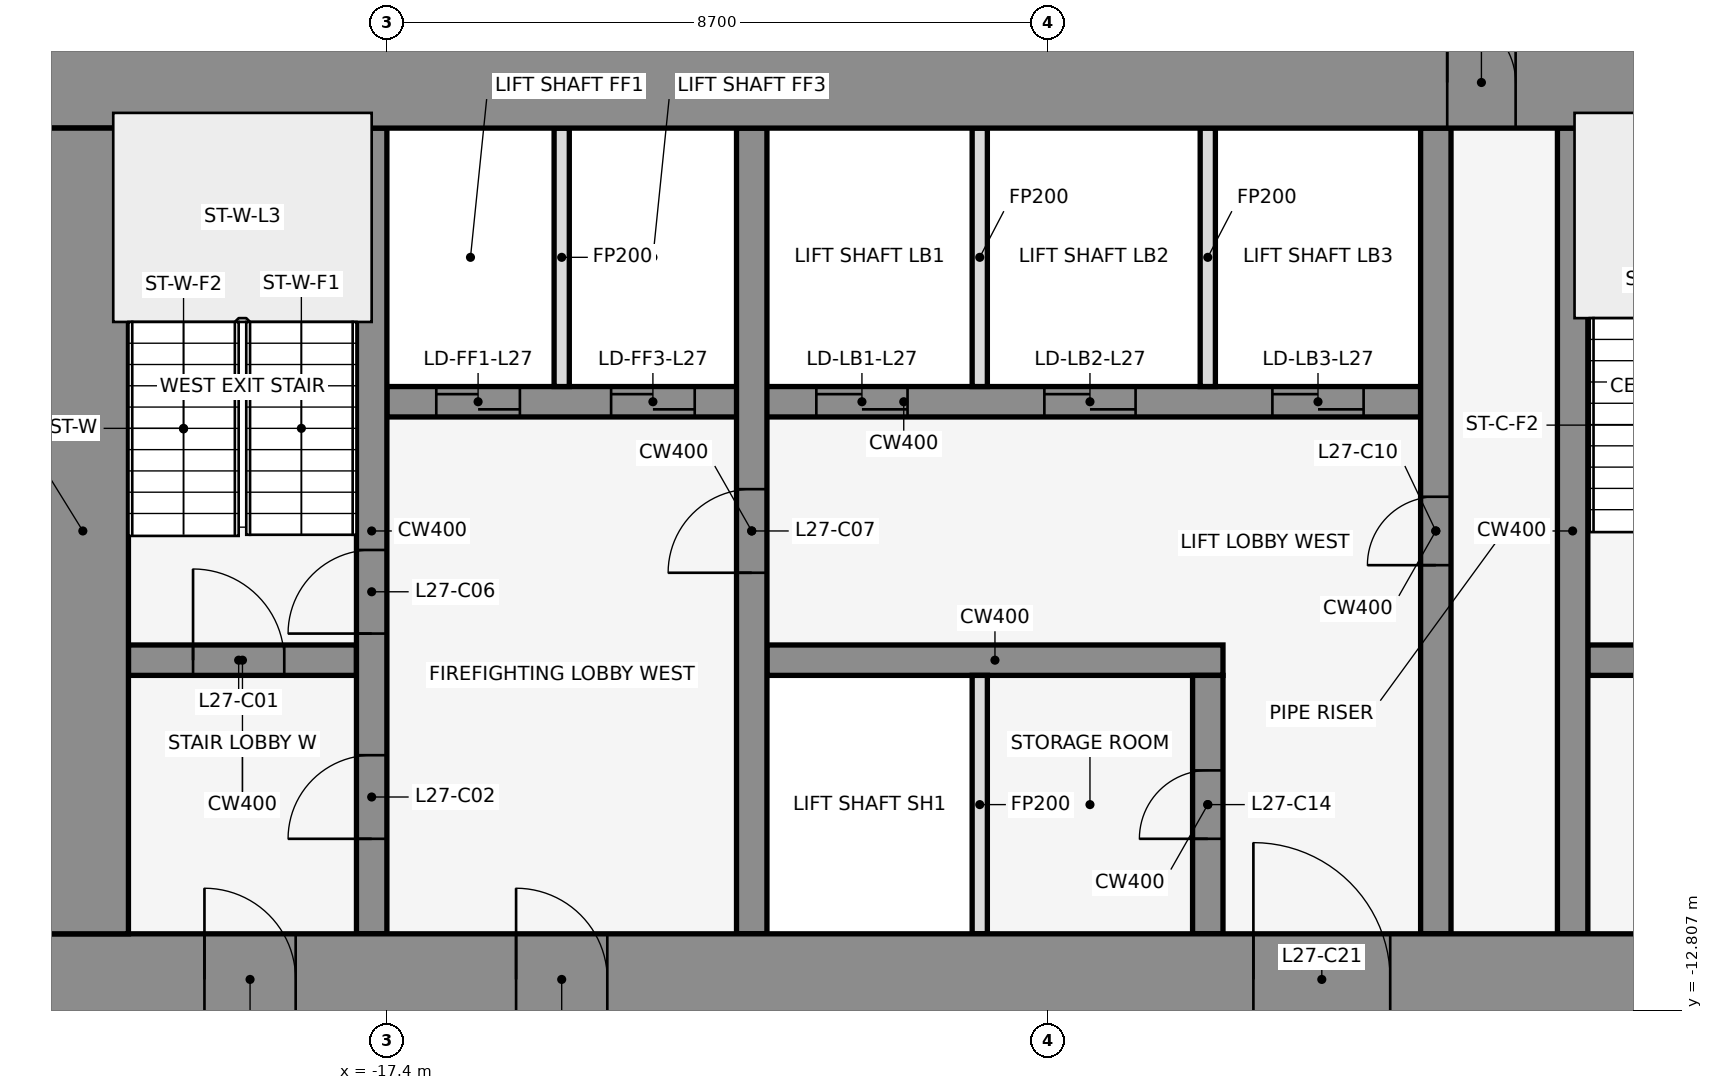
"""IFC4 building model, lengths in metres.
Left out: names, types, materials, properties, quantities, classifications, styles, units other than length and angle.
Written with IfcOpenShell. Run it as: python <this file> out.ifc"""

import sys

from ifc_helpers import new_model, si_unit, direction, frame, frame_2d, origin, place, context, subcontext, project, spatial, rectangle, extrude, element, fill, save


model = new_model("IFC4")
c1 = context("Model", 3, precision=1e-05, world=origin(), true_north=direction((0.0, 1.0)))
c2 = subcontext(c1, "Body", "Model", "MODEL_VIEW")
j1 = project(units=[si_unit("LENGTHUNIT", "METRE"), si_unit("PLANEANGLEUNIT", "RADIAN")], contexts=[c1])
p1 = place(None, origin())
s1 = spatial("IfcSite", under=j1, at=p1, CompositionType="ELEMENT")
p2 = place(p1, origin())
s2 = spatial("IfcBuilding", under=s1, at=p2, CompositionType="ELEMENT")
p3 = place(p2, frame((0.0, 0.0, 126.8)))
s3 = spatial("IfcBuildingStorey", under=s2, at=p3, CompositionType="ELEMENT", Elevation=126.8)
for number, where, z_axis, x_axis in (
    (1, (-0.068, -0.105, 0.0), (0.0, 0.0, 1.0), (-0.84, 0.543, 0.0)),
    (2, (-14.599, 1.08, 0.0), (0.0, 0.0, 1.0), (-0.84, -0.543, 0.0)),
):
    element("IfcWall", number, at=place(p3, frame(where, z_axis=z_axis, x_axis=x_axis)), inside=s3, PredefinedType="STANDARD", context=c2, shape_type="SweptSolid", body=[
        extrude(rectangle(XDim=2.183, YDim=0.25, at=frame_2d((1.091, 0.0))), origin(), (0.0, 0.0, 1.0), 3.95),
    ])
p4 = place(p3, frame((-20.8, -8.2, 0.0), z_axis=(0.0, 0.0, 1.0), x_axis=(1.0, 0.0, 0.0)))
e3 = element("IfcWall", 3, at=p4, inside=s3, PredefinedType="SHEAR", context=c2, shape_type="SweptSolid", body=[
    extrude(rectangle(XDim=3.0, YDim=0.4, at=frame_2d((1.5, 0.0))), origin(), (0.0, 0.0, 1.0), 4.1),
])
p5 = place(p4, frame((0.85, 0.0, 0.0)))
e4 = element("IfcOpeningElement", 4, at=p5, cuts=e3, PredefinedType="OPENING", context=c2, shape_type="SweptSolid", body=[
    extrude(rectangle(XDim=1.2, YDim=2.1, at=frame_2d((0.6, 1.05))), frame((0.0, 0.212, 0.0), z_axis=(0.0, -1.0, 0.0), x_axis=(1.0, 0.0, 0.0)), (0.0, 0.0, 1.0), 0.424),
])
p6 = place(p3, frame((-12.4, -8.2, 0.0), z_axis=(0.0, 0.0, 1.0), x_axis=(1.0, 0.0, 0.0)))
e5 = element("IfcWall", 5, at=p6, inside=s3, PredefinedType="SHEAR", context=c2, shape_type="SweptSolid", body=[
    extrude(rectangle(XDim=6.0, YDim=0.4, at=frame_2d((3.0, 0.0))), origin(), (0.0, 0.0, 1.0), 4.1),
])
p7 = place(p3, frame((-1.6, -8.2, 0.0), z_axis=(0.0, 0.0, 1.0), x_axis=(1.0, 0.0, 0.0)))
e6 = element("IfcWall", 6, at=p7, inside=s3, PredefinedType="SHEAR", context=c2, shape_type="SweptSolid", body=[
    extrude(rectangle(XDim=3.2, YDim=0.4, at=frame_2d((1.6, 0.0))), origin(), (0.0, 0.0, 1.0), 4.1),
])
p8 = place(p7, frame((1.05, 0.0, 0.0)))
e7 = element("IfcOpeningElement", 7, at=p8, cuts=e6, PredefinedType="OPENING", context=c2, shape_type="SweptSolid", body=[
    extrude(rectangle(XDim=1.2, YDim=2.1, at=frame_2d((0.6, 1.05))), frame((0.0, 0.212, 0.0), z_axis=(0.0, -1.0, 0.0), x_axis=(1.0, 0.0, 0.0)), (0.0, 0.0, 1.0), 0.424),
])
p9 = place(p3, frame((-17.4, -4.8, 0.0), z_axis=(0.0, 0.0, 1.0), x_axis=(1.0, 0.0, 0.0)))
e8 = element("IfcWall", 8, at=p9, inside=s3, PredefinedType="SHEAR", context=c2, shape_type="SweptSolid", body=[
    extrude(rectangle(XDim=13.6, YDim=0.4, at=frame_2d((6.8, 0.0))), origin(), (0.0, 0.0, 1.0), 4.1),
])
p10 = place(p9, frame((0.65, 0.0, 0.0)))
e9 = element("IfcOpeningElement", 9, at=p10, cuts=e8, PredefinedType="OPENING", context=c2, shape_type="SweptSolid", body=[
    extrude(rectangle(XDim=1.1, YDim=2.1, at=frame_2d((0.55, 1.05))), frame((0.0, 0.212, 0.0), z_axis=(0.0, -1.0, 0.0), x_axis=(1.0, 0.0, 0.0)), (0.0, 0.0, 1.0), 0.424),
])
p11 = place(p9, frame((2.95, 0.0, 0.0)))
e10 = element("IfcOpeningElement", 10, at=p11, cuts=e8, PredefinedType="OPENING", context=c2, shape_type="SweptSolid", body=[
    extrude(rectangle(XDim=1.1, YDim=2.1, at=frame_2d((0.55, 1.05))), frame((0.0, 0.212, 0.0), z_axis=(0.0, -1.0, 0.0), x_axis=(1.0, 0.0, 0.0)), (0.0, 0.0, 1.0), 0.424),
])
p12 = place(p9, frame((5.65, 0.0, 0.0)))
e11 = element("IfcOpeningElement", 11, at=p12, cuts=e8, PredefinedType="OPENING", context=c2, shape_type="SweptSolid", body=[
    extrude(rectangle(XDim=1.2, YDim=2.1, at=frame_2d((0.6, 1.05))), frame((0.0, 0.212, 0.0), z_axis=(0.0, -1.0, 0.0), x_axis=(1.0, 0.0, 0.0)), (0.0, 0.0, 1.0), 0.424),
])
p13 = place(p9, frame((8.65, 0.0, 0.0)))
e12 = element("IfcOpeningElement", 12, at=p13, cuts=e8, PredefinedType="OPENING", context=c2, shape_type="SweptSolid", body=[
    extrude(rectangle(XDim=1.2, YDim=2.1, at=frame_2d((0.6, 1.05))), frame((0.0, 0.212, 0.0), z_axis=(0.0, -1.0, 0.0), x_axis=(1.0, 0.0, 0.0)), (0.0, 0.0, 1.0), 0.424),
])
p14 = place(p9, frame((11.65, 0.0, 0.0)))
e13 = element("IfcOpeningElement", 13, at=p14, cuts=e8, PredefinedType="OPENING", context=c2, shape_type="SweptSolid", body=[
    extrude(rectangle(XDim=1.2, YDim=2.1, at=frame_2d((0.6, 1.05))), frame((0.0, 0.212, 0.0), z_axis=(0.0, -1.0, 0.0), x_axis=(1.0, 0.0, 0.0)), (0.0, 0.0, 1.0), 0.424),
])
p15 = place(p3, frame((-17.6, -11.8, 0.0), z_axis=(0.0, 0.0, 1.0), x_axis=(0.0, 1.0, 0.0)))
e14 = element("IfcWall", 14, at=p15, inside=s3, PredefinedType="SHEAR", context=c2, shape_type="SweptSolid", body=[
    extrude(rectangle(XDim=10.6, YDim=0.4, at=frame_2d((5.3, 0.0))), origin(), (0.0, 0.0, 1.0), 4.1),
])
p16 = place(p15, frame((1.25, 0.0, 0.0)))
e15 = element("IfcOpeningElement", 15, at=p16, cuts=e14, PredefinedType="OPENING", context=c2, shape_type="SweptSolid", body=[
    extrude(rectangle(XDim=1.1, YDim=2.1, at=frame_2d((0.55, 1.05))), frame((0.0, 0.212, 0.0), z_axis=(0.0, -1.0, 0.0), x_axis=(1.0, 0.0, 0.0)), (0.0, 0.0, 1.0), 0.424),
])
p17 = place(p15, frame((3.95, 0.0, 0.0)))
e16 = element("IfcOpeningElement", 16, at=p17, cuts=e14, PredefinedType="OPENING", context=c2, shape_type="SweptSolid", body=[
    extrude(rectangle(XDim=1.1, YDim=2.1, at=frame_2d((0.55, 1.05))), frame((0.0, 0.212, 0.0), z_axis=(0.0, -1.0, 0.0), x_axis=(1.0, 0.0, 0.0)), (0.0, 0.0, 1.0), 0.424),
])
p18 = place(p3, frame((-15.1, -4.6, 0.0), z_axis=(0.0, 0.0, 1.0), x_axis=(0.0, 1.0, 0.0)))
e17 = element("IfcWall", 17, at=p18, inside=s3, PredefinedType="PARTITIONING", context=c2, shape_type="SweptSolid", body=[
    extrude(rectangle(XDim=3.4, YDim=0.2, at=frame_2d((1.7, 0.0))), origin(), (0.0, 0.0, 1.0), 2.939),
])
p19 = place(p3, frame((-12.6, -11.8, 0.0), z_axis=(0.0, 0.0, 1.0), x_axis=(0.0, 1.0, 0.0)))
e18 = element("IfcWall", 18, at=p19, inside=s3, PredefinedType="SHEAR", context=c2, shape_type="SweptSolid", body=[
    extrude(rectangle(XDim=10.6, YDim=0.4, at=frame_2d((5.3, 0.0))), origin(), (0.0, 0.0, 1.0), 4.1),
])
p20 = place(p19, frame((4.75, 0.0, 0.0)))
e19 = element("IfcOpeningElement", 19, at=p20, cuts=e18, PredefinedType="OPENING", context=c2, shape_type="SweptSolid", body=[
    extrude(rectangle(XDim=1.1, YDim=2.1, at=frame_2d((0.55, 1.05))), frame((0.0, 0.212, 0.0), z_axis=(0.0, -1.0, 0.0), x_axis=(1.0, 0.0, 0.0)), (0.0, 0.0, 1.0), 0.424),
])
for number, where, z_axis, x_axis in (
    (20, (-9.6, -11.8, 0.0), (0.0, 0.0, 1.0), (0.0, 1.0, 0.0)),
    (21, (-9.6, -4.6, 0.0), (0.0, 0.0, 1.0), (0.0, 1.0, 0.0)),
):
    element("IfcWall", number, at=place(p3, frame(where, z_axis=z_axis, x_axis=x_axis)), inside=s3, PredefinedType="PARTITIONING", context=c2, shape_type="SweptSolid", body=[
        extrude(rectangle(XDim=3.4, YDim=0.2, at=frame_2d((1.7, 0.0))), origin(), (0.0, 0.0, 1.0), 2.939),
    ])
p21 = place(p3, frame((-6.6, -11.8, 0.0), z_axis=(0.0, 0.0, 1.0), x_axis=(0.0, 1.0, 0.0)))
e22 = element("IfcWall", 22, at=p21, inside=s3, PredefinedType="SHEAR", context=c2, shape_type="SweptSolid", body=[
    extrude(rectangle(XDim=3.4, YDim=0.4, at=frame_2d((1.7, 0.0))), origin(), (0.0, 0.0, 1.0), 4.1),
])
p22 = place(p21, frame((1.25, 0.0, 0.0)))
e23 = element("IfcOpeningElement", 23, at=p22, cuts=e22, PredefinedType="OPENING", context=c2, shape_type="SweptSolid", body=[
    extrude(rectangle(XDim=0.9, YDim=2.1, at=frame_2d((0.45, 1.05))), frame((0.0, 0.212, 0.0), z_axis=(0.0, -1.0, 0.0), x_axis=(1.0, 0.0, 0.0)), (0.0, 0.0, 1.0), 0.424),
])
p23 = place(p3, frame((-6.6, -4.6, 0.0), z_axis=(0.0, 0.0, 1.0), x_axis=(0.0, 1.0, 0.0)))
e24 = element("IfcWall", 24, at=p23, inside=s3, PredefinedType="PARTITIONING", context=c2, shape_type="SweptSolid", body=[
    extrude(rectangle(XDim=3.4, YDim=0.2, at=frame_2d((1.7, 0.0))), origin(), (0.0, 0.0, 1.0), 2.939),
])
p24 = place(p3, frame((-3.6, -11.8, 0.0), z_axis=(0.0, 0.0, 1.0), x_axis=(0.0, 1.0, 0.0)))
e25 = element("IfcWall", 25, at=p24, inside=s3, PredefinedType="SHEAR", context=c2, shape_type="SweptSolid", body=[
    extrude(rectangle(XDim=10.6, YDim=0.4, at=frame_2d((5.3, 0.0))), origin(), (0.0, 0.0, 1.0), 4.1),
])
p25 = place(p24, frame((4.85, 0.0, 0.0)))
e26 = element("IfcOpeningElement", 26, at=p25, cuts=e25, PredefinedType="OPENING", context=c2, shape_type="SweptSolid", body=[
    extrude(rectangle(XDim=0.9, YDim=2.1, at=frame_2d((0.45, 1.05))), frame((0.0, 0.212, 0.0), z_axis=(0.0, -1.0, 0.0), x_axis=(1.0, 0.0, 0.0)), (0.0, 0.0, 1.0), 0.424),
])
p26 = place(p3, frame((-1.8, -11.8, 0.0), z_axis=(0.0, 0.0, 1.0), x_axis=(0.0, 1.0, 0.0)))
e27 = element("IfcWall", 27, at=p26, inside=s3, PredefinedType="SHEAR", context=c2, shape_type="SweptSolid", body=[
    extrude(rectangle(XDim=10.6, YDim=0.4, at=frame_2d((5.3, 0.0))), origin(), (0.0, 0.0, 1.0), 4.1),
])
p27 = place(p3, frame((-22.0, -0.6, 0.0), z_axis=(0.0, 0.0, 1.0), x_axis=(1.0, 0.0, 0.0)))
e28 = element("IfcWall", 28, at=p27, inside=s3, PredefinedType="SHEAR", context=c2, shape_type="SweptSolid", body=[
    extrude(rectangle(XDim=44.0, YDim=1.2, at=frame_2d((22.0, 0.0))), origin(), (0.0, 0.0, 1.0), 4.1),
])
p28 = place(p27, frame((18.55, 0.0, 0.0)))
e29 = element("IfcOpeningElement", 29, at=p28, cuts=e28, PredefinedType="OPENING", context=c2, shape_type="SweptSolid", body=[
    extrude(rectangle(XDim=0.9, YDim=2.1, at=frame_2d((0.45, 1.05))), frame((0.0, 0.612, 0.0), z_axis=(0.0, -1.0, 0.0), x_axis=(1.0, 0.0, 0.0)), (0.0, 0.0, 1.0), 1.224),
])
p29 = place(p27, frame((24.55, 0.0, 0.0)))
e30 = element("IfcOpeningElement", 30, at=p29, cuts=e28, PredefinedType="OPENING", context=c2, shape_type="SweptSolid", body=[
    extrude(rectangle(XDim=0.9, YDim=2.1, at=frame_2d((0.45, 1.05))), frame((0.0, 0.612, 0.0), z_axis=(0.0, -1.0, 0.0), x_axis=(1.0, 0.0, 0.0)), (0.0, 0.0, 1.0), 1.224),
])
p30 = place(p3, frame((-22.0, -12.4, 0.0), z_axis=(0.0, 0.0, 1.0), x_axis=(1.0, 0.0, 0.0)))
e31 = element("IfcWall", 31, at=p30, inside=s3, PredefinedType="SHEAR", context=c2, shape_type="SweptSolid", body=[
    extrude(rectangle(XDim=44.0, YDim=1.2, at=frame_2d((22.0, 0.0))), origin(), (0.0, 0.0, 1.0), 4.1),
])
p31 = place(p30, frame((2.2, 0.0, 0.0)))
e32 = element("IfcOpeningElement", 32, at=p31, cuts=e31, PredefinedType="OPENING", context=c2, shape_type="SweptSolid", body=[
    extrude(rectangle(XDim=1.2, YDim=2.1, at=frame_2d((0.6, 1.05))), frame((0.0, 0.612, 0.0), z_axis=(0.0, -1.0, 0.0), x_axis=(1.0, 0.0, 0.0)), (0.0, 0.0, 1.0), 1.224),
])
p32 = place(p30, frame((21.4, 0.0, 0.0)))
e33 = element("IfcOpeningElement", 33, at=p32, cuts=e31, PredefinedType="OPENING", context=c2, shape_type="SweptSolid", body=[
    extrude(rectangle(XDim=1.2, YDim=2.1, at=frame_2d((0.6, 1.05))), frame((0.0, 0.612, 0.0), z_axis=(0.0, -1.0, 0.0), x_axis=(1.0, 0.0, 0.0)), (0.0, 0.0, 1.0), 1.224),
])
p33 = place(p30, frame((40.6, 0.0, 0.0)))
e34 = element("IfcOpeningElement", 34, at=p33, cuts=e31, PredefinedType="OPENING", context=c2, shape_type="SweptSolid", body=[
    extrude(rectangle(XDim=1.2, YDim=2.1, at=frame_2d((0.6, 1.05))), frame((0.0, 0.612, 0.0), z_axis=(0.0, -1.0, 0.0), x_axis=(1.0, 0.0, 0.0)), (0.0, 0.0, 1.0), 1.224),
])
p34 = place(p30, frame((16.0, 0.0, 0.0)))
e35 = element("IfcOpeningElement", 35, at=p34, cuts=e31, PredefinedType="OPENING", context=c2, shape_type="SweptSolid", body=[
    extrude(rectangle(XDim=1.8, YDim=2.1, at=frame_2d((0.9, 1.05))), frame((0.0, 0.612, 0.0), z_axis=(0.0, -1.0, 0.0), x_axis=(1.0, 0.0, 0.0)), (0.0, 0.0, 1.0), 1.224),
])
p35 = place(p30, frame((6.3, 0.0, 0.0)))
e36 = element("IfcOpeningElement", 36, at=p35, cuts=e31, PredefinedType="OPENING", context=c2, shape_type="SweptSolid", body=[
    extrude(rectangle(XDim=1.2, YDim=2.1, at=frame_2d((0.6, 1.05))), frame((0.0, 0.612, 0.0), z_axis=(0.0, -1.0, 0.0), x_axis=(1.0, 0.0, 0.0)), (0.0, 0.0, 1.0), 1.224),
])
p36 = place(p30, frame((26.2, 0.0, 0.0)))
e37 = element("IfcOpeningElement", 37, at=p36, cuts=e31, PredefinedType="OPENING", context=c2, shape_type="SweptSolid", body=[
    extrude(rectangle(XDim=1.8, YDim=2.1, at=frame_2d((0.9, 1.05))), frame((0.0, 0.612, 0.0), z_axis=(0.0, -1.0, 0.0), x_axis=(1.0, 0.0, 0.0)), (0.0, 0.0, 1.0), 1.224),
])
p37 = place(p30, frame((36.5, 0.0, 0.0)))
e38 = element("IfcOpeningElement", 38, at=p37, cuts=e31, PredefinedType="OPENING", context=c2, shape_type="SweptSolid", body=[
    extrude(rectangle(XDim=1.2, YDim=2.1, at=frame_2d((0.6, 1.05))), frame((0.0, 0.612, 0.0), z_axis=(0.0, -1.0, 0.0), x_axis=(1.0, 0.0, 0.0)), (0.0, 0.0, 1.0), 1.224),
])
p38 = place(p3, frame((-21.4, -11.8, 0.0), z_axis=(0.0, 0.0, 1.0), x_axis=(0.0, 1.0, 0.0)))
e39 = element("IfcWall", 39, at=p38, inside=s3, PredefinedType="SHEAR", context=c2, shape_type="SweptSolid", body=[
    extrude(rectangle(XDim=10.6, YDim=1.2, at=frame_2d((5.3, 0.0))), origin(), (0.0, 0.0, 1.0), 4.1),
])
p39 = place(p5, origin())
e40 = element("IfcDoor", 40, at=p39, inside=s3, OperationType="SINGLE_SWING_LEFT", PredefinedType="DOOR", context=c2, shape_type="SweptSolid", body=[
    extrude(rectangle(XDim=1.2, YDim=2.1, at=frame_2d((0.6, 1.05))), frame((0.0, 0.025, 0.0), z_axis=(0.0, -1.0, 0.0), x_axis=(1.0, 0.0, 0.0)), (0.0, 0.0, 1.0), 0.05),
])
fill(e4, e40)
p40 = place(p16, frame((1.1, 0.0, 0.0), z_axis=(0.0, 0.0, 1.0), x_axis=(-1.0, 0.0, 0.0)))
e41 = element("IfcDoor", 41, at=p40, inside=s3, OperationType="SINGLE_SWING_LEFT", PredefinedType="DOOR", context=c2, shape_type="SweptSolid", body=[
    extrude(rectangle(XDim=1.1, YDim=2.1, at=frame_2d((0.55, 1.05))), frame((0.0, 0.025, 0.0), z_axis=(0.0, -1.0, 0.0), x_axis=(1.0, 0.0, 0.0)), (0.0, 0.0, 1.0), 0.05),
])
fill(e15, e41)
p41 = place(p10, origin())
e42 = element("IfcDoor", 42, at=p41, inside=s3, OperationType="DOUBLE_DOOR_SLIDING", PredefinedType="DOOR", context=c2, shape_type="SweptSolid", body=[
    extrude(rectangle(XDim=1.1, YDim=2.1, at=frame_2d((0.55, 1.05))), frame((0.0, 0.025, 0.0), z_axis=(0.0, -1.0, 0.0), x_axis=(1.0, 0.0, 0.0)), (0.0, 0.0, 1.0), 0.05),
])
fill(e9, e42)
p42 = place(p11, origin())
e43 = element("IfcDoor", 43, at=p42, inside=s3, OperationType="DOUBLE_DOOR_SLIDING", PredefinedType="DOOR", context=c2, shape_type="SweptSolid", body=[
    extrude(rectangle(XDim=1.1, YDim=2.1, at=frame_2d((0.55, 1.05))), frame((0.0, 0.025, 0.0), z_axis=(0.0, -1.0, 0.0), x_axis=(1.0, 0.0, 0.0)), (0.0, 0.0, 1.0), 0.05),
])
fill(e10, e43)
p43 = place(p12, origin())
e44 = element("IfcDoor", 44, at=p43, inside=s3, OperationType="DOUBLE_DOOR_SLIDING", PredefinedType="DOOR", context=c2, shape_type="SweptSolid", body=[
    extrude(rectangle(XDim=1.2, YDim=2.1, at=frame_2d((0.6, 1.05))), frame((0.0, 0.025, 0.0), z_axis=(0.0, -1.0, 0.0), x_axis=(1.0, 0.0, 0.0)), (0.0, 0.0, 1.0), 0.05),
])
fill(e11, e44)
p44 = place(p13, origin())
e45 = element("IfcDoor", 45, at=p44, inside=s3, OperationType="DOUBLE_DOOR_SLIDING", PredefinedType="DOOR", context=c2, shape_type="SweptSolid", body=[
    extrude(rectangle(XDim=1.2, YDim=2.1, at=frame_2d((0.6, 1.05))), frame((0.0, 0.025, 0.0), z_axis=(0.0, -1.0, 0.0), x_axis=(1.0, 0.0, 0.0)), (0.0, 0.0, 1.0), 0.05),
])
fill(e12, e45)
p45 = place(p14, origin())
e46 = element("IfcDoor", 46, at=p45, inside=s3, OperationType="DOUBLE_DOOR_SLIDING", PredefinedType="DOOR", context=c2, shape_type="SweptSolid", body=[
    extrude(rectangle(XDim=1.2, YDim=2.1, at=frame_2d((0.6, 1.05))), frame((0.0, 0.025, 0.0), z_axis=(0.0, -1.0, 0.0), x_axis=(1.0, 0.0, 0.0)), (0.0, 0.0, 1.0), 0.05),
])
fill(e13, e46)
p46 = place(p17, frame((1.1, 0.0, 0.0), z_axis=(0.0, 0.0, 1.0), x_axis=(-1.0, 0.0, 0.0)))
e47 = element("IfcDoor", 47, at=p46, inside=s3, OperationType="SINGLE_SWING_LEFT", PredefinedType="DOOR", context=c2, shape_type="SweptSolid", body=[
    extrude(rectangle(XDim=1.1, YDim=2.1, at=frame_2d((0.55, 1.05))), frame((0.0, 0.025, 0.0), z_axis=(0.0, -1.0, 0.0), x_axis=(1.0, 0.0, 0.0)), (0.0, 0.0, 1.0), 0.05),
])
fill(e16, e47)
p47 = place(p20, origin())
e48 = element("IfcDoor", 48, at=p47, inside=s3, OperationType="SINGLE_SWING_LEFT", PredefinedType="DOOR", context=c2, shape_type="SweptSolid", body=[
    extrude(rectangle(XDim=1.1, YDim=2.1, at=frame_2d((0.55, 1.05))), frame((0.0, 0.025, 0.0), z_axis=(0.0, -1.0, 0.0), x_axis=(1.0, 0.0, 0.0)), (0.0, 0.0, 1.0), 0.05),
])
fill(e19, e48)
p48 = place(p25, frame((0.9, 0.0, 0.0), z_axis=(0.0, 0.0, 1.0), x_axis=(-1.0, 0.0, 0.0)))
e49 = element("IfcDoor", 49, at=p48, inside=s3, OperationType="SINGLE_SWING_LEFT", PredefinedType="DOOR", context=c2, shape_type="SweptSolid", body=[
    extrude(rectangle(XDim=0.9, YDim=2.1, at=frame_2d((0.45, 1.05))), frame((0.0, 0.025, 0.0), z_axis=(0.0, -1.0, 0.0), x_axis=(1.0, 0.0, 0.0)), (0.0, 0.0, 1.0), 0.05),
])
fill(e26, e49)
p49 = place(p22, origin())
e50 = element("IfcDoor", 50, at=p49, inside=s3, OperationType="SINGLE_SWING_RIGHT", PredefinedType="DOOR", context=c2, shape_type="SweptSolid", body=[
    extrude(rectangle(XDim=0.9, YDim=2.1, at=frame_2d((0.45, 1.05))), frame((0.0, 0.025, 0.0), z_axis=(0.0, -1.0, 0.0), x_axis=(1.0, 0.0, 0.0)), (0.0, 0.0, 1.0), 0.05),
])
fill(e23, e50)
p50 = place(p28, origin())
e51 = element("IfcDoor", 51, at=p50, inside=s3, OperationType="SINGLE_SWING_LEFT", PredefinedType="DOOR", context=c2, shape_type="SweptSolid", body=[
    extrude(rectangle(XDim=0.9, YDim=2.1, at=frame_2d((0.45, 1.05))), frame((0.0, 0.025, 0.0), z_axis=(0.0, -1.0, 0.0), x_axis=(1.0, 0.0, 0.0)), (0.0, 0.0, 1.0), 0.05),
])
fill(e29, e51)
p51 = place(p31, frame((1.2, 0.0, 0.0), z_axis=(0.0, 0.0, 1.0), x_axis=(-1.0, 0.0, 0.0)))
e52 = element("IfcDoor", 52, at=p51, inside=s3, OperationType="SINGLE_SWING_RIGHT", PredefinedType="DOOR", context=c2, shape_type="SweptSolid", body=[
    extrude(rectangle(XDim=1.2, YDim=2.1, at=frame_2d((0.6, 1.05))), frame((0.0, 0.025, 0.0), z_axis=(0.0, -1.0, 0.0), x_axis=(1.0, 0.0, 0.0)), (0.0, 0.0, 1.0), 0.05),
])
fill(e32, e52)
p52 = place(p34, origin())
e53 = element("IfcDoor", 53, at=p52, inside=s3, OperationType="SINGLE_SWING_LEFT", PredefinedType="DOOR", context=c2, shape_type="SweptSolid", body=[
    extrude(rectangle(XDim=1.8, YDim=2.1, at=frame_2d((0.9, 1.05))), frame((0.0, 0.025, 0.0), z_axis=(0.0, -1.0, 0.0), x_axis=(1.0, 0.0, 0.0)), (0.0, 0.0, 1.0), 0.05),
])
fill(e35, e53)
p53 = place(p35, frame((1.2, 0.0, 0.0), z_axis=(0.0, 0.0, 1.0), x_axis=(-1.0, 0.0, 0.0)))
e54 = element("IfcDoor", 54, at=p53, inside=s3, OperationType="SINGLE_SWING_RIGHT", PredefinedType="DOOR", context=c2, shape_type="SweptSolid", body=[
    extrude(rectangle(XDim=1.2, YDim=2.1, at=frame_2d((0.6, 1.05))), frame((0.0, 0.025, 0.0), z_axis=(0.0, -1.0, 0.0), x_axis=(1.0, 0.0, 0.0)), (0.0, 0.0, 1.0), 0.05),
])
fill(e36, e54)
save(model, sys.argv[1])
